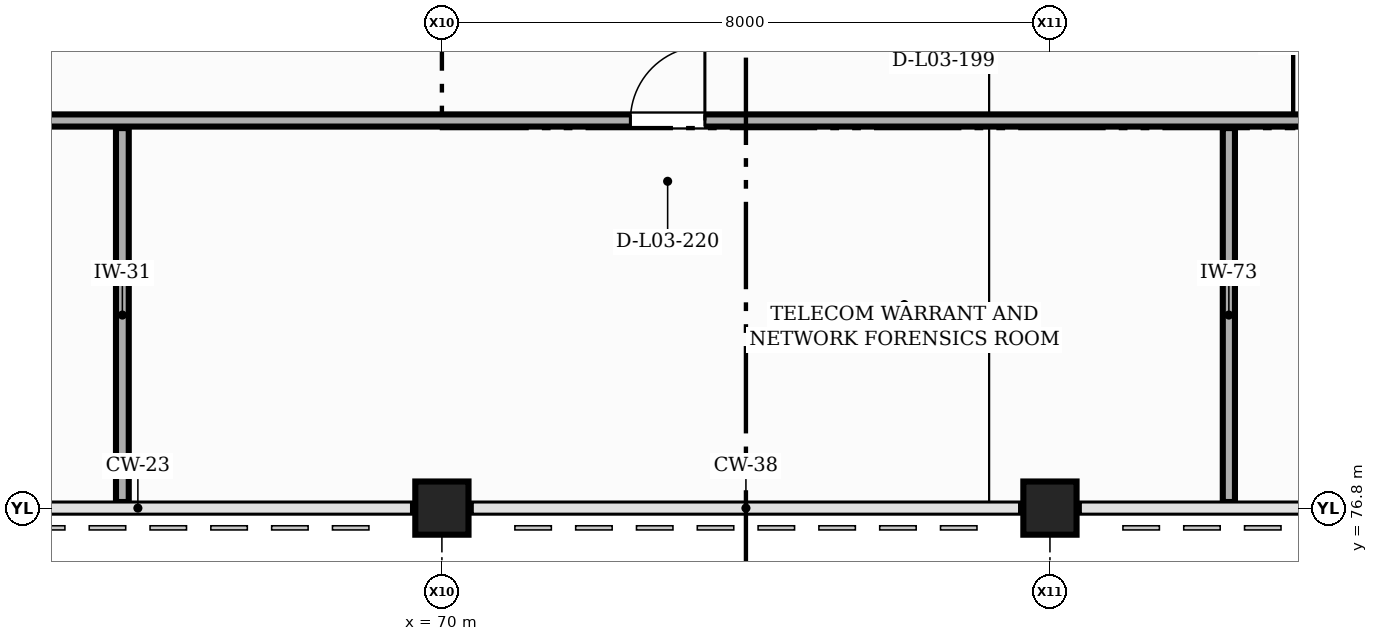
"""IFC4 building model, lengths in metres.
Left out: names, types, materials, properties, quantities, classifications, styles, units other than length and angle.
Written with IfcOpenShell. Run it as: python <this file> out.ifc"""

import sys

from ifc_helpers import new_model, si_unit, direction, frame, frame_2d, origin, origin_2d, place, context, subcontext, project, spatial, rectangle, extrude, element, fill, save


model = new_model("IFC4")
c1 = context("Model", 3, precision=1e-05, world=origin(), true_north=direction((0.0, 1.0)))
c2 = subcontext(c1, "Body", "Model", "MODEL_VIEW")
j1 = project(units=[si_unit("LENGTHUNIT", "METRE"), si_unit("PLANEANGLEUNIT", "RADIAN")], contexts=[c1])
p1 = place(None, origin())
s1 = spatial("IfcSite", under=j1, at=p1, CompositionType="ELEMENT")
p2 = place(p1, origin())
s2 = spatial("IfcBuilding", under=s1, at=p2, CompositionType="ELEMENT")
p3 = place(p2, frame((0.0, 0.0, 13.5)))
s3 = spatial("IfcBuildingStorey", under=s2, at=p3, CompositionType="ELEMENT", Elevation=13.5)
for number, where, z_axis, x_axis in (
    (1, (70.0, 76.8, 0.0), (0.0, 0.0, 1.0), (1.0, 0.0, 0.0)),
    (2, (78.0, 76.8, 0.0), (0.0, 0.0, 1.0), (1.0, 0.0, 0.0)),
):
    element("IfcColumn", number, at=place(p3, frame(where, z_axis=z_axis, x_axis=x_axis)), inside=s3, PredefinedType="COLUMN", context=c2, shape_type="SweptSolid", body=[
        extrude(rectangle(XDim=0.7, YDim=0.7, at=origin_2d()), origin(), (0.0, 0.0, 1.0), 4.5),
    ])
p4 = place(p3, frame((65.796, 76.88, 0.0), z_axis=(0.0, 0.0, 1.0), x_axis=(0.0, 1.0, 0.0)))
e3 = element("IfcWall", 3, at=p4, inside=s3, PredefinedType="PARTITIONING", context=c2, shape_type="SweptSolid", body=[
    extrude(rectangle(XDim=4.92, YDim=0.168, at=frame_2d((2.46, 0.0))), origin(), (0.0, 0.0, 1.0), 3.525),
])
p5 = place(p3, frame((80.354, 76.88, 0.0), z_axis=(0.0, 0.0, 1.0), x_axis=(0.0, 1.0, 0.0)))
e4 = element("IfcWall", 4, at=p5, inside=s3, PredefinedType="PARTITIONING", context=c2, shape_type="SweptSolid", body=[
    extrude(rectangle(XDim=4.92, YDim=0.16, at=frame_2d((2.46, 0.0))), origin(), (0.0, 0.0, 1.0), 3.525),
])
p6 = place(p3, frame((29.3, 81.9, 0.0), z_axis=(0.0, 0.0, 1.0), x_axis=(1.0, 0.0, 0.0)))
e5 = element("IfcWall", 5, at=p6, inside=s3, PredefinedType="PARTITIONING", context=c2, shape_type="SweptSolid", body=[
    extrude(rectangle(XDim=64.62, YDim=0.16, at=frame_2d((32.31, 0.0))), origin(), (0.0, 0.0, 1.0), 3.525),
])
p7 = place(p6, frame((9.17, 0.0, 0.0)))
e6 = element("IfcOpeningElement", 6, at=p7, cuts=e5, PredefinedType="OPENING", context=c2, shape_type="SweptSolid", body=[
    extrude(rectangle(XDim=0.92, YDim=2.1, at=frame_2d((0.46, 1.05))), frame((0.0, 0.09, 0.0), z_axis=(0.0, -1.0, 0.0), x_axis=(1.0, 0.0, 0.0)), (0.0, 0.0, 1.0), 0.18),
])
p8 = place(p6, frame((27.4, 0.0, 0.0)))
e7 = element("IfcOpeningElement", 7, at=p8, cuts=e5, PredefinedType="OPENING", context=c2, shape_type="SweptSolid", body=[
    extrude(rectangle(XDim=0.95, YDim=2.1, at=frame_2d((0.475, 1.05))), frame((0.0, 0.09, 0.0), z_axis=(0.0, -1.0, 0.0), x_axis=(1.0, 0.0, 0.0)), (0.0, 0.0, 1.0), 0.18),
])
p9 = place(p6, frame((43.18, 0.0, 0.0)))
e8 = element("IfcOpeningElement", 8, at=p9, cuts=e5, PredefinedType="OPENING", context=c2, shape_type="SweptSolid", body=[
    extrude(rectangle(XDim=0.98, YDim=2.12, at=frame_2d((0.49, 1.06))), frame((0.0, 0.09, 0.0), z_axis=(0.0, -1.0, 0.0), x_axis=(1.0, 0.0, 0.0)), (0.0, 0.0, 1.0), 0.18),
])
p10 = place(p6, frame((57.17, 0.0, 0.0)))
e9 = element("IfcOpeningElement", 9, at=p10, cuts=e5, PredefinedType="OPENING", context=c2, shape_type="SweptSolid", body=[
    extrude(rectangle(XDim=1.0, YDim=2.1, at=frame_2d((0.5, 1.05))), frame((0.0, 0.09, 0.0), z_axis=(0.0, -1.0, 0.0), x_axis=(1.0, 0.0, 0.0)), (0.0, 0.0, 1.0), 0.18),
])
p11 = place(p9, origin())
e10 = element("IfcDoor", 10, at=p11, inside=s3, OperationType="SINGLE_SWING_RIGHT", PredefinedType="DOOR", context=c2, shape_type="SweptSolid", body=[
    extrude(rectangle(XDim=0.98, YDim=2.12, at=frame_2d((0.49, 1.06))), frame((0.0, 0.025, 0.0), z_axis=(0.0, -1.0, 0.0), x_axis=(1.0, 0.0, 0.0)), (0.0, 0.0, 1.0), 0.05),
])
fill(e8, e10)
save(model, sys.argv[1])
